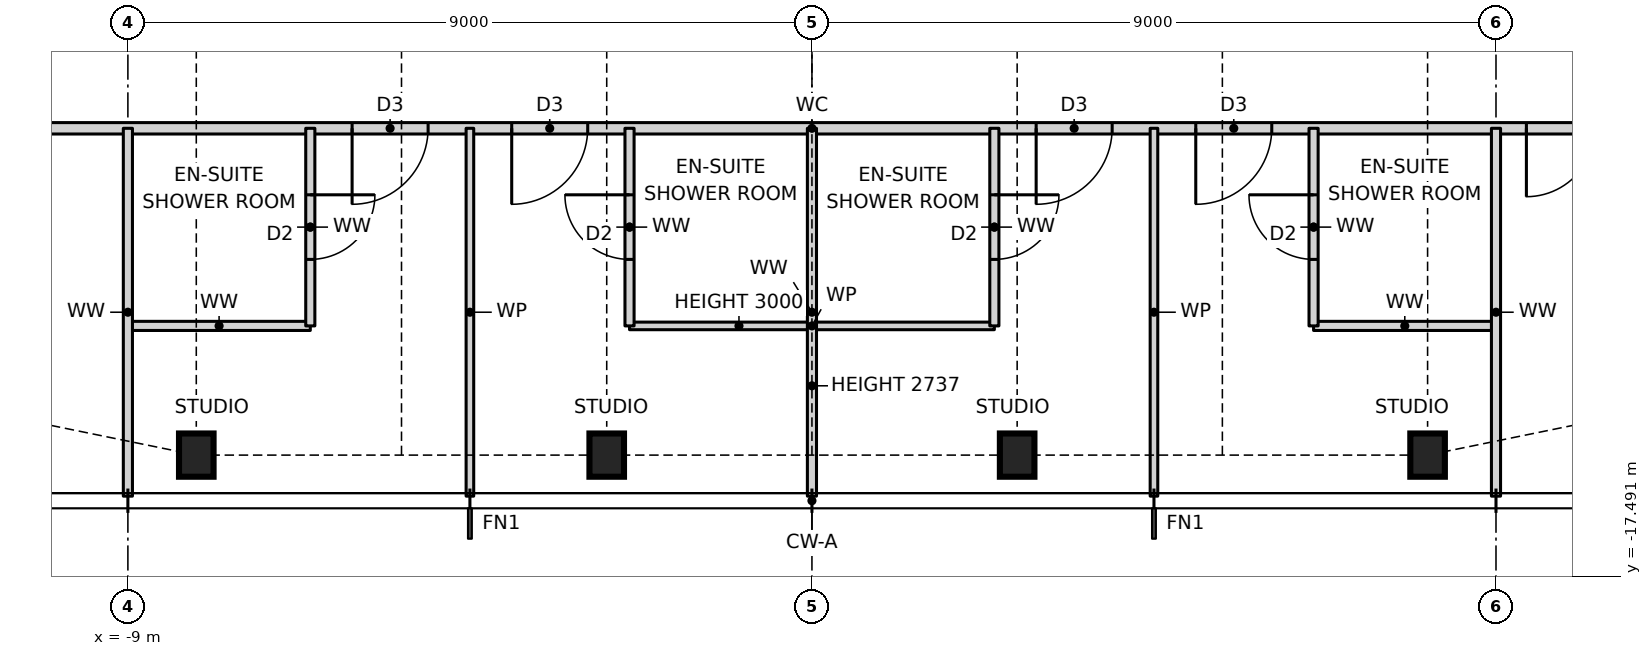
"""IFC4 building model, lengths in metres.
Left out: names, types, materials, properties, quantities, classifications, styles, units other than length and angle.
Written with IfcOpenShell. Run it as: python <this file> out.ifc"""

import sys

from ifc_helpers import new_model, si_unit, direction, frame, frame_2d, origin, origin_2d, place, context, subcontext, project, spatial, rectangle, i_section, extrude, element, fill, save


model = new_model("IFC4")
c1 = context("Model", 3, precision=1e-05, world=origin(), true_north=direction((0.0, 1.0)))
c2 = subcontext(c1, "Body", "Model", "MODEL_VIEW")
j1 = project(units=[si_unit("LENGTHUNIT", "METRE"), si_unit("PLANEANGLEUNIT", "RADIAN")], contexts=[c1])
p1 = place(None, origin())
s1 = spatial("IfcSite", under=j1, at=p1, CompositionType="ELEMENT")
p2 = place(p1, origin())
s2 = spatial("IfcBuilding", under=s1, at=p2, CompositionType="ELEMENT")
p3 = place(p2, frame((0.0, 0.0, 225.5)))
s3 = spatial("IfcBuildingStorey", under=s2, at=p3, CompositionType="ELEMENT", Elevation=225.5)
for number, where, z_axis, x_axis in (
    (1, (-8.1, -15.9, 0.0), (0.0, 0.0, 1.0), (1.0, 0.0, 0.0)),
    (2, (-2.7, -15.9, 0.0), (0.0, 0.0, 1.0), (1.0, 0.0, 0.0)),
    (3, (2.7, -15.9, 0.0), (0.0, 0.0, 1.0), (1.0, 0.0, 0.0)),
    (4, (8.1, -15.9, 0.0), (0.0, 0.0, 1.0), (1.0, 0.0, 0.0)),
):
    element("IfcColumn", number, at=place(p3, frame(where, z_axis=z_axis, x_axis=x_axis)), inside=s3, PredefinedType="COLUMN", context=c2, shape_type="SweptSolid", body=[
        extrude(i_section(OverallWidth=0.455, OverallDepth=0.569, WebThickness=0.078, FlangeThickness=0.125, at=origin_2d()), origin(), (0.0, 0.0, 1.0), 3.5),
    ])
p4 = place(p3, frame((-9.0, -14.2, 0.0), z_axis=(0.0, 0.0, 1.0), x_axis=(1.0, 0.0, 0.0)))
e5 = element("IfcWall", 5, at=p4, inside=s3, PredefinedType="PARTITIONING", context=c2, shape_type="SweptSolid", body=[
    extrude(rectangle(XDim=2.4, YDim=0.12, at=frame_2d((1.2, 0.0))), origin(), (0.0, 0.0, 1.0), 3.27),
])
p5 = place(p3, frame((-2.4, -14.2, 0.0), z_axis=(0.0, 0.0, 1.0), x_axis=(1.0, 0.0, 0.0)))
e6 = element("IfcWall", 6, at=p5, inside=s3, PredefinedType="PARTITIONING", context=c2, shape_type="SweptSolid", body=[
    extrude(rectangle(XDim=4.8, YDim=0.1, at=frame_2d((2.4, 0.0))), origin(), (0.0, 0.0, 1.0), 3.0),
])
p6 = place(p3, frame((6.6, -14.2, 0.0), z_axis=(0.0, 0.0, 1.0), x_axis=(1.0, 0.0, 0.0)))
e7 = element("IfcWall", 7, at=p6, inside=s3, PredefinedType="PARTITIONING", context=c2, shape_type="SweptSolid", body=[
    extrude(rectangle(XDim=2.4, YDim=0.12, at=frame_2d((1.2, 0.0))), origin(), (0.0, 0.0, 1.0), 3.27),
])
p7 = place(p3, frame((-11.6, -11.6, 0.0), z_axis=(0.0, 0.0, 1.0), x_axis=(1.0, 0.0, 0.0)))
e8 = element("IfcWall", 8, at=p7, inside=s3, PredefinedType="PARTITIONING", context=c2, shape_type="SweptSolid", body=[
    extrude(rectangle(XDim=23.2, YDim=0.15, at=frame_2d((11.6, 0.0))), origin(), (0.0, 0.0, 1.0), 3.27),
])
p8 = place(p7, frame((5.55, 0.0, 0.0)))
e9 = element("IfcOpeningElement", 9, at=p8, cuts=e8, PredefinedType="OPENING", context=c2, shape_type="SweptSolid", body=[
    extrude(rectangle(XDim=1.0, YDim=2.1, at=frame_2d((0.5, 1.05))), frame((0.0, 0.085, 0.0), z_axis=(0.0, -1.0, 0.0), x_axis=(1.0, 0.0, 0.0)), (0.0, 0.0, 1.0), 0.17),
])
p9 = place(p7, frame((7.65, 0.0, 0.0)))
e10 = element("IfcOpeningElement", 10, at=p9, cuts=e8, PredefinedType="OPENING", context=c2, shape_type="SweptSolid", body=[
    extrude(rectangle(XDim=1.0, YDim=2.1, at=frame_2d((0.5, 1.05))), frame((0.0, 0.085, 0.0), z_axis=(0.0, -1.0, 0.0), x_axis=(1.0, 0.0, 0.0)), (0.0, 0.0, 1.0), 0.17),
])
p10 = place(p7, frame((14.55, 0.0, 0.0)))
e11 = element("IfcOpeningElement", 11, at=p10, cuts=e8, PredefinedType="OPENING", context=c2, shape_type="SweptSolid", body=[
    extrude(rectangle(XDim=1.0, YDim=2.1, at=frame_2d((0.5, 1.05))), frame((0.0, 0.085, 0.0), z_axis=(0.0, -1.0, 0.0), x_axis=(1.0, 0.0, 0.0)), (0.0, 0.0, 1.0), 0.17),
])
p11 = place(p7, frame((16.65, 0.0, 0.0)))
e12 = element("IfcOpeningElement", 12, at=p11, cuts=e8, PredefinedType="OPENING", context=c2, shape_type="SweptSolid", body=[
    extrude(rectangle(XDim=1.0, YDim=2.1, at=frame_2d((0.5, 1.05))), frame((0.0, 0.085, 0.0), z_axis=(0.0, -1.0, 0.0), x_axis=(1.0, 0.0, 0.0)), (0.0, 0.0, 1.0), 0.17),
])
p12 = place(p7, frame((21.0, 0.0, 0.0)))
e13 = element("IfcOpeningElement", 13, at=p12, cuts=e8, PredefinedType="OPENING", context=c2, shape_type="SweptSolid", body=[
    extrude(rectangle(XDim=1.8, YDim=2.1, at=frame_2d((0.9, 1.05))), frame((0.0, 0.085, 0.0), z_axis=(0.0, -1.0, 0.0), x_axis=(1.0, 0.0, 0.0)), (0.0, 0.0, 1.0), 0.17),
])
p13 = place(p3, frame((9.0, -16.44, 0.0), z_axis=(0.0, 0.0, 1.0), x_axis=(0.0, 1.0, 0.0)))
e14 = element("IfcWall", 14, at=p13, inside=s3, PredefinedType="PARTITIONING", context=c2, shape_type="SweptSolid", body=[
    extrude(rectangle(XDim=4.84, YDim=0.12, at=frame_2d((2.42, 0.0))), origin(), (0.0, 0.0, 1.0), 3.27),
])
p14 = place(p3, frame((6.6, -14.2, 0.0), z_axis=(0.0, 0.0, 1.0), x_axis=(0.0, 1.0, 0.0)))
e15 = element("IfcWall", 15, at=p14, inside=s3, PredefinedType="PARTITIONING", context=c2, shape_type="SweptSolid", body=[
    extrude(rectangle(XDim=2.6, YDim=0.12, at=frame_2d((1.3, 0.0))), origin(), (0.0, 0.0, 1.0), 3.27),
])
p15 = place(p14, frame((0.875, 0.0, 0.0)))
e16 = element("IfcOpeningElement", 16, at=p15, cuts=e15, PredefinedType="OPENING", context=c2, shape_type="SweptSolid", body=[
    extrude(rectangle(XDim=0.85, YDim=2.1, at=frame_2d((0.425, 1.05))), frame((0.0, 0.07, 0.0), z_axis=(0.0, -1.0, 0.0), x_axis=(1.0, 0.0, 0.0)), (0.0, 0.0, 1.0), 0.14),
])
p16 = place(p3, frame((4.5, -16.44, 0.0), z_axis=(0.0, 0.0, 1.0), x_axis=(0.0, 1.0, 0.0)))
e17 = element("IfcWall", 17, at=p16, inside=s3, PredefinedType="PARTITIONING", context=c2, shape_type="SweptSolid", body=[
    extrude(rectangle(XDim=4.84, YDim=0.1, at=frame_2d((2.42, 0.0))), origin(), (0.0, 0.0, 1.0), 3.27),
])
p17 = place(p3, frame((2.4, -14.2, 0.0), z_axis=(0.0, 0.0, 1.0), x_axis=(0.0, 1.0, 0.0)))
e18 = element("IfcWall", 18, at=p17, inside=s3, PredefinedType="PARTITIONING", context=c2, shape_type="SweptSolid", body=[
    extrude(rectangle(XDim=2.6, YDim=0.12, at=frame_2d((1.3, 0.0))), origin(), (0.0, 0.0, 1.0), 3.27),
])
p18 = place(p17, frame((0.875, 0.0, 0.0)))
e19 = element("IfcOpeningElement", 19, at=p18, cuts=e18, PredefinedType="OPENING", context=c2, shape_type="SweptSolid", body=[
    extrude(rectangle(XDim=0.85, YDim=2.1, at=frame_2d((0.425, 1.05))), frame((0.0, 0.07, 0.0), z_axis=(0.0, -1.0, 0.0), x_axis=(1.0, 0.0, 0.0)), (0.0, 0.0, 1.0), 0.14),
])
p19 = place(p3, frame((0.0, -16.44, 0.0), z_axis=(0.0, 0.0, 1.0), x_axis=(0.0, 1.0, 0.0)))
e20 = element("IfcWall", 20, at=p19, inside=s3, PredefinedType="PARTITIONING", context=c2, shape_type="SweptSolid", body=[
    extrude(rectangle(XDim=4.84, YDim=0.12, at=frame_2d((2.42, 0.0))), origin(), (0.0, 0.0, 1.0), 2.737),
])
p20 = place(p3, frame((-2.4, -14.2, 0.0), z_axis=(0.0, 0.0, 1.0), x_axis=(0.0, 1.0, 0.0)))
e21 = element("IfcWall", 21, at=p20, inside=s3, PredefinedType="PARTITIONING", context=c2, shape_type="SweptSolid", body=[
    extrude(rectangle(XDim=2.6, YDim=0.12, at=frame_2d((1.3, 0.0))), origin(), (0.0, 0.0, 1.0), 3.27),
])
p21 = place(p20, frame((0.875, 0.0, 0.0)))
e22 = element("IfcOpeningElement", 22, at=p21, cuts=e21, PredefinedType="OPENING", context=c2, shape_type="SweptSolid", body=[
    extrude(rectangle(XDim=0.85, YDim=2.1, at=frame_2d((0.425, 1.05))), frame((0.0, 0.07, 0.0), z_axis=(0.0, -1.0, 0.0), x_axis=(1.0, 0.0, 0.0)), (0.0, 0.0, 1.0), 0.14),
])
p22 = place(p3, frame((-4.5, -16.44, 0.0), z_axis=(0.0, 0.0, 1.0), x_axis=(0.0, 1.0, 0.0)))
e23 = element("IfcWall", 23, at=p22, inside=s3, PredefinedType="PARTITIONING", context=c2, shape_type="SweptSolid", body=[
    extrude(rectangle(XDim=4.84, YDim=0.1, at=frame_2d((2.42, 0.0))), origin(), (0.0, 0.0, 1.0), 3.27),
])
p23 = place(p3, frame((-6.6, -14.2, 0.0), z_axis=(0.0, 0.0, 1.0), x_axis=(0.0, 1.0, 0.0)))
e24 = element("IfcWall", 24, at=p23, inside=s3, PredefinedType="PARTITIONING", context=c2, shape_type="SweptSolid", body=[
    extrude(rectangle(XDim=2.6, YDim=0.12, at=frame_2d((1.3, 0.0))), origin(), (0.0, 0.0, 1.0), 3.27),
])
p24 = place(p23, frame((0.875, 0.0, 0.0)))
e25 = element("IfcOpeningElement", 25, at=p24, cuts=e24, PredefinedType="OPENING", context=c2, shape_type="SweptSolid", body=[
    extrude(rectangle(XDim=0.85, YDim=2.1, at=frame_2d((0.425, 1.05))), frame((0.0, 0.07, 0.0), z_axis=(0.0, -1.0, 0.0), x_axis=(1.0, 0.0, 0.0)), (0.0, 0.0, 1.0), 0.14),
])
p25 = place(p3, frame((-9.0, -16.44, 0.0), z_axis=(0.0, 0.0, 1.0), x_axis=(0.0, 1.0, 0.0)))
e26 = element("IfcWall", 26, at=p25, inside=s3, PredefinedType="PARTITIONING", context=c2, shape_type="SweptSolid", body=[
    extrude(rectangle(XDim=4.84, YDim=0.12, at=frame_2d((2.42, 0.0))), origin(), (0.0, 0.0, 1.0), 3.27),
])
p26 = place(p8, frame((1.0, 0.0, 0.0), z_axis=(0.0, 0.0, 1.0), x_axis=(-1.0, 0.0, 0.0)))
e27 = element("IfcDoor", 27, at=p26, inside=s3, OperationType="SINGLE_SWING_RIGHT", PredefinedType="DOOR", context=c2, shape_type="SweptSolid", body=[
    extrude(rectangle(XDim=1.0, YDim=2.1, at=frame_2d((0.5, 1.05))), frame((0.0, 0.025, 0.0), z_axis=(0.0, -1.0, 0.0), x_axis=(1.0, 0.0, 0.0)), (0.0, 0.0, 1.0), 0.05),
])
fill(e9, e27)
p27 = place(p24, frame((0.85, 0.0, 0.0), z_axis=(0.0, 0.0, 1.0), x_axis=(-1.0, 0.0, 0.0)))
e28 = element("IfcDoor", 28, at=p27, inside=s3, OperationType="SINGLE_SWING_LEFT", PredefinedType="DOOR", context=c2, shape_type="SweptSolid", body=[
    extrude(rectangle(XDim=0.85, YDim=2.1, at=frame_2d((0.425, 1.05))), frame((0.0, 0.025, 0.0), z_axis=(0.0, -1.0, 0.0), x_axis=(1.0, 0.0, 0.0)), (0.0, 0.0, 1.0), 0.05),
])
fill(e25, e28)
p28 = place(p9, frame((1.0, 0.0, 0.0), z_axis=(0.0, 0.0, 1.0), x_axis=(-1.0, 0.0, 0.0)))
e29 = element("IfcDoor", 29, at=p28, inside=s3, OperationType="SINGLE_SWING_RIGHT", PredefinedType="DOOR", context=c2, shape_type="SweptSolid", body=[
    extrude(rectangle(XDim=1.0, YDim=2.1, at=frame_2d((0.5, 1.05))), frame((0.0, 0.025, 0.0), z_axis=(0.0, -1.0, 0.0), x_axis=(1.0, 0.0, 0.0)), (0.0, 0.0, 1.0), 0.05),
])
fill(e10, e29)
p29 = place(p21, origin())
e30 = element("IfcDoor", 30, at=p29, inside=s3, OperationType="SINGLE_SWING_RIGHT", PredefinedType="DOOR", context=c2, shape_type="SweptSolid", body=[
    extrude(rectangle(XDim=0.85, YDim=2.1, at=frame_2d((0.425, 1.05))), frame((0.0, 0.025, 0.0), z_axis=(0.0, -1.0, 0.0), x_axis=(1.0, 0.0, 0.0)), (0.0, 0.0, 1.0), 0.05),
])
fill(e22, e30)
p30 = place(p10, frame((1.0, 0.0, 0.0), z_axis=(0.0, 0.0, 1.0), x_axis=(-1.0, 0.0, 0.0)))
e31 = element("IfcDoor", 31, at=p30, inside=s3, OperationType="SINGLE_SWING_RIGHT", PredefinedType="DOOR", context=c2, shape_type="SweptSolid", body=[
    extrude(rectangle(XDim=1.0, YDim=2.1, at=frame_2d((0.5, 1.05))), frame((0.0, 0.025, 0.0), z_axis=(0.0, -1.0, 0.0), x_axis=(1.0, 0.0, 0.0)), (0.0, 0.0, 1.0), 0.05),
])
fill(e11, e31)
p31 = place(p18, frame((0.85, 0.0, 0.0), z_axis=(0.0, 0.0, 1.0), x_axis=(-1.0, 0.0, 0.0)))
e32 = element("IfcDoor", 32, at=p31, inside=s3, OperationType="SINGLE_SWING_LEFT", PredefinedType="DOOR", context=c2, shape_type="SweptSolid", body=[
    extrude(rectangle(XDim=0.85, YDim=2.1, at=frame_2d((0.425, 1.05))), frame((0.0, 0.025, 0.0), z_axis=(0.0, -1.0, 0.0), x_axis=(1.0, 0.0, 0.0)), (0.0, 0.0, 1.0), 0.05),
])
fill(e19, e32)
p32 = place(p11, frame((1.0, 0.0, 0.0), z_axis=(0.0, 0.0, 1.0), x_axis=(-1.0, 0.0, 0.0)))
e33 = element("IfcDoor", 33, at=p32, inside=s3, OperationType="SINGLE_SWING_RIGHT", PredefinedType="DOOR", context=c2, shape_type="SweptSolid", body=[
    extrude(rectangle(XDim=1.0, YDim=2.1, at=frame_2d((0.5, 1.05))), frame((0.0, 0.025, 0.0), z_axis=(0.0, -1.0, 0.0), x_axis=(1.0, 0.0, 0.0)), (0.0, 0.0, 1.0), 0.05),
])
fill(e12, e33)
p33 = place(p15, origin())
e34 = element("IfcDoor", 34, at=p33, inside=s3, OperationType="SINGLE_SWING_RIGHT", PredefinedType="DOOR", context=c2, shape_type="SweptSolid", body=[
    extrude(rectangle(XDim=0.85, YDim=2.1, at=frame_2d((0.425, 1.05))), frame((0.0, 0.025, 0.0), z_axis=(0.0, -1.0, 0.0), x_axis=(1.0, 0.0, 0.0)), (0.0, 0.0, 1.0), 0.05),
])
fill(e16, e34)
p34 = place(p12, frame((1.8, 0.0, 0.0), z_axis=(0.0, 0.0, 1.0), x_axis=(-1.0, 0.0, 0.0)))
e35 = element("IfcDoor", 35, at=p34, inside=s3, OperationType="DOUBLE_DOOR_SINGLE_SWING", PredefinedType="DOOR", context=c2, shape_type="SweptSolid", body=[
    extrude(rectangle(XDim=1.8, YDim=2.1, at=frame_2d((0.9, 1.05))), frame((0.0, 0.025, 0.0), z_axis=(0.0, -1.0, 0.0), x_axis=(1.0, 0.0, 0.0)), (0.0, 0.0, 1.0), 0.05),
])
fill(e13, e35)
save(model, sys.argv[1])
